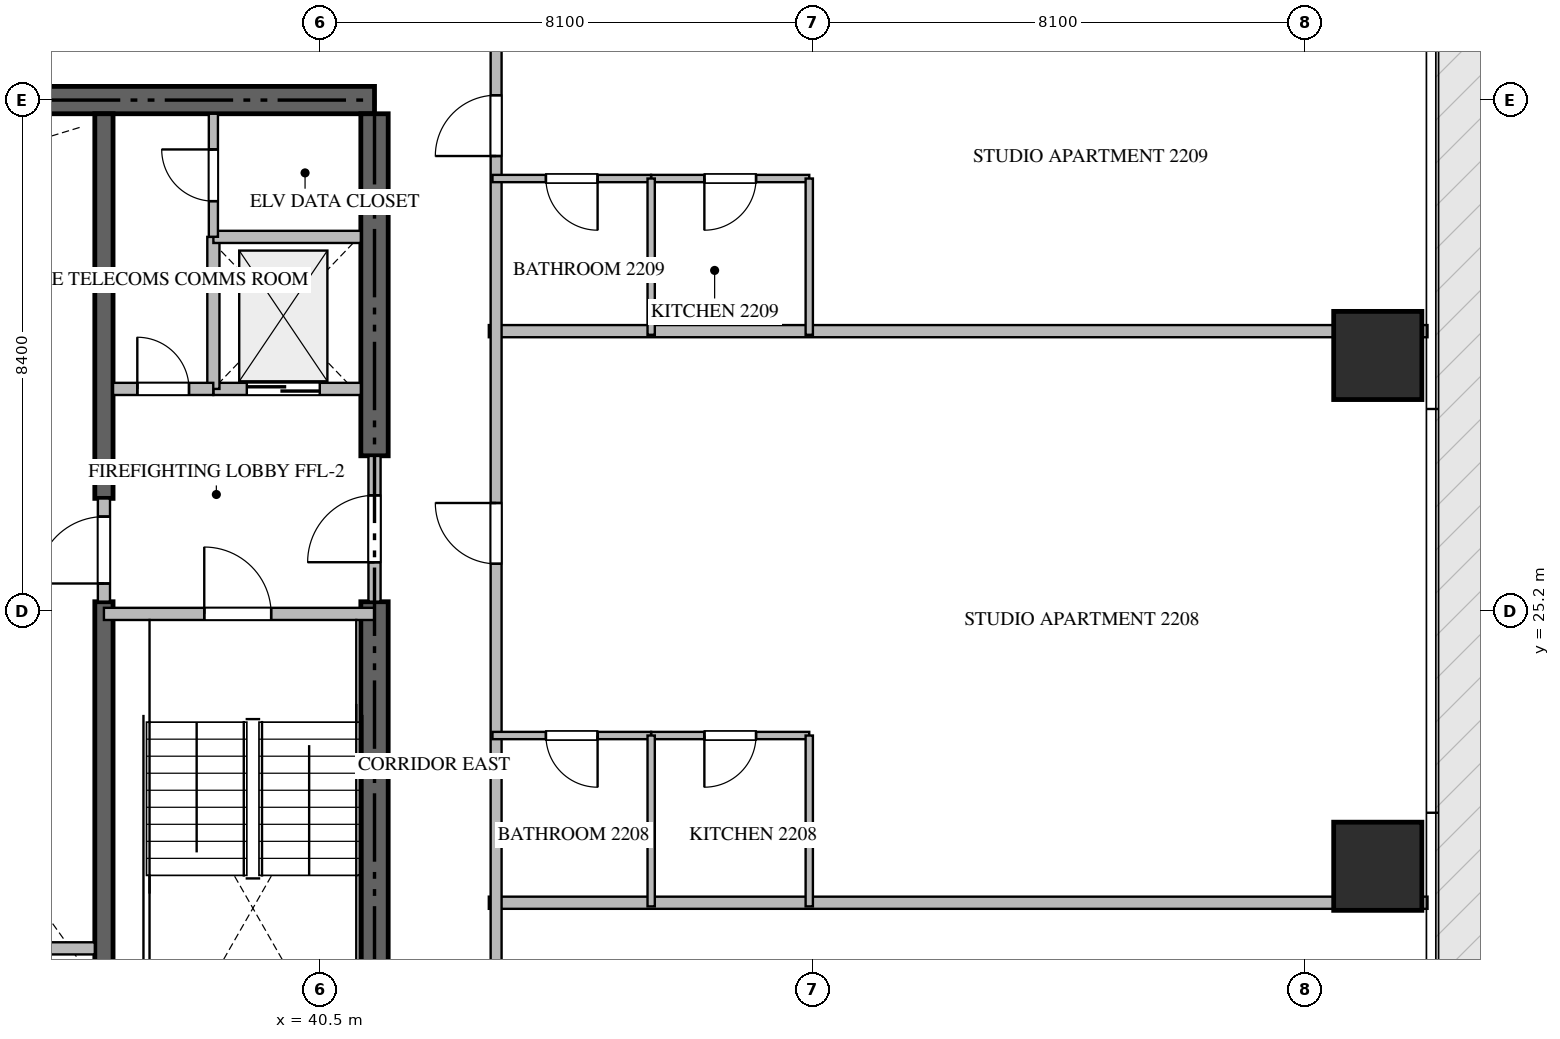
"""IFC4 building model, lengths in metres.
Left out: names, types, materials, properties, quantities, classifications, styles, units other than length and angle.
Written with IfcOpenShell. Run it as: python <this file> out.ifc"""

import sys

from ifc_helpers import new_model, si_unit, direction, frame, frame_2d, origin, origin_2d, place, context, subcontext, project, spatial, rectangle, extrude, source, transform, mapped, element, fill, save


model = new_model("IFC4")
c1 = context("Model", 3, precision=1e-05, world=origin(), true_north=direction((0.0, 1.0)))
c2 = subcontext(c1, "Body", "Model", "MODEL_VIEW")
j1 = project(units=[si_unit("LENGTHUNIT", "METRE"), si_unit("PLANEANGLEUNIT", "RADIAN")], contexts=[c1])
p1 = place(None, origin())
s1 = spatial("IfcSite", under=j1, at=p1, CompositionType="ELEMENT")
p2 = place(p1, origin())
s2 = spatial("IfcBuilding", under=s1, at=p2, CompositionType="ELEMENT")
p3 = place(p2, frame((0.0, 0.0, 90.45)))
s3 = spatial("IfcBuildingStorey", under=s2, at=p3, CompositionType="ELEMENT", Elevation=90.45)
p4 = place(p3, frame((41.4, 33.6, -0.26), z_axis=(0.0, 0.0, 1.0), x_axis=(-1.0, 0.0, 0.0)))
e1 = element("IfcWall", 1, at=p4, inside=s3, PredefinedType="SHEAR", context=c2, shape_type="SweptSolid", body=[
    extrude(rectangle(XDim=18.0, YDim=0.45, at=frame_2d((9.0, 0.0))), origin(), (0.0, 0.0, 1.0), 3.748),
])
p5 = place(p3, frame((41.4, 17.025, -0.26), z_axis=(0.0, 0.0, 1.0), x_axis=(0.0, 1.0, 0.0)))
e2 = element("IfcWall", 2, at=p5, inside=s3, PredefinedType="SHEAR", context=c2, shape_type="SweptSolid", body=[
    extrude(rectangle(XDim=8.325, YDim=0.45, at=frame_2d((4.163, 0.0))), origin(), (0.0, 0.0, 1.0), 3.748),
])
p6 = place(p3, frame((41.4, 27.75, -0.26), z_axis=(0.0, 0.0, 1.0), x_axis=(0.0, 1.0, 0.0)))
e3 = element("IfcWall", 3, at=p6, inside=s3, PredefinedType="SHEAR", context=c2, shape_type="SweptSolid", body=[
    extrude(rectangle(XDim=5.625, YDim=0.45, at=frame_2d((2.812, 0.0))), origin(), (0.0, 0.0, 1.0), 3.748),
])
p7 = place(p3, frame((36.95, 17.025, -0.26), z_axis=(0.0, 0.0, 1.0), x_axis=(0.0, 1.0, 0.0)))
e4 = element("IfcWall", 4, at=p7, inside=s3, PredefinedType="SHEAR", context=c2, shape_type="SweptSolid", body=[
    extrude(rectangle(XDim=8.325, YDim=0.3, at=frame_2d((4.163, 0.0))), origin(), (0.0, 0.0, 1.0), 3.748),
])
p8 = place(p3, frame((36.95, 27.05, -0.26), z_axis=(0.0, 0.0, 1.0), x_axis=(0.0, 1.0, 0.0)))
e5 = element("IfcWall", 5, at=p8, inside=s3, PredefinedType="SHEAR", context=c2, shape_type="SweptSolid", body=[
    extrude(rectangle(XDim=6.325, YDim=0.3, at=frame_2d((3.163, 0.0))), origin(), (0.0, 0.0, 1.0), 3.748),
])
m1 = source(origin(), c2, "Body", "SweptSolid", [
    extrude(rectangle(XDim=1.45, YDim=1.45, at=origin_2d()), origin(), (0.0, 0.0, 1.0), 3.75),
])
for number, where, z_axis, x_axis in (
    (6, (57.9, 21.0, -0.26), (0.0, 0.0, 1.0), (1.0, 0.0, 0.0)),
    (7, (57.9, 29.4, -0.26), (0.0, 0.0, 1.0), (1.0, 0.0, 0.0)),
):
    element("IfcColumn", number, at=place(p3, frame(where, z_axis=z_axis, x_axis=x_axis)), inside=s3, PredefinedType="COLUMN", context=c2, shape_type="MappedRepresentation", body=[
        mapped(m1, transform((0.0, 0.0, 0.0), scale=1.0)),
    ])
p9 = place(p3, frame((36.95, 25.15, 0.0), z_axis=(0.0, 0.0, 1.0), x_axis=(1.0, 0.0, 0.0)))
e8 = element("IfcWall", 8, at=p9, inside=s3, PredefinedType="STANDARD", context=c2, shape_type="SweptSolid", body=[
    extrude(rectangle(XDim=4.45, YDim=0.2, at=frame_2d((2.225, 0.0))), origin(), (0.0, 0.0, 1.0), 3.49),
])
p10 = place(p9, frame((1.65, 0.0, 0.0)))
e9 = element("IfcOpeningElement", 9, at=p10, cuts=e8, PredefinedType="OPENING", context=c2, shape_type="SweptSolid", body=[
    extrude(rectangle(XDim=1.1, YDim=2.15, at=frame_2d((0.55, 1.075))), frame((0.0, 0.11, 0.0), z_axis=(0.0, -1.0, 0.0), x_axis=(1.0, 0.0, 0.0)), (0.0, 0.0, 1.0), 0.22),
])
p11 = place(p3, frame((38.75, 28.85, 0.0), z_axis=(0.0, 0.0, 1.0), x_axis=(1.0, 0.0, 0.0)))
e10 = element("IfcWall", 10, at=p11, inside=s3, PredefinedType="STANDARD", context=c2, shape_type="SweptSolid", body=[
    extrude(rectangle(XDim=2.425, YDim=0.2, at=frame_2d((1.212, 0.0))), origin(), (0.0, 0.0, 1.0), 3.49),
])
p12 = place(p11, frame((0.55, 0.0, 0.0)))
e11 = element("IfcOpeningElement", 11, at=p12, cuts=e10, PredefinedType="OPENING", context=c2, shape_type="SweptSolid", body=[
    extrude(rectangle(XDim=1.2, YDim=2.2, at=frame_2d((0.6, 1.1))), frame((0.0, 0.11, 0.0), z_axis=(0.0, -1.0, 0.0), x_axis=(1.0, 0.0, 0.0)), (0.0, 0.0, 1.0), 0.22),
])
p13 = place(p3, frame((33.05, 19.65, 0.0), z_axis=(0.0, 0.0, 1.0), x_axis=(1.0, 0.0, 0.0)))
e12 = element("IfcWall", 12, at=p13, inside=s3, PredefinedType="STANDARD", context=c2, shape_type="SweptSolid", body=[
    extrude(rectangle(XDim=3.75, YDim=0.2, at=frame_2d((1.875, 0.0))), origin(), (0.0, 0.0, 1.0), 3.49),
])
p14 = place(p13, frame((0.65, 0.0, 0.0)))
e13 = element("IfcOpeningElement", 13, at=p14, cuts=e12, PredefinedType="OPENING", context=c2, shape_type="SweptSolid", body=[
    extrude(rectangle(XDim=1.1, YDim=2.2, at=frame_2d((0.55, 1.1))), frame((0.0, 0.11, 0.0), z_axis=(0.0, -1.0, 0.0), x_axis=(1.0, 0.0, 0.0)), (0.0, 0.0, 1.0), 0.22),
])
p15 = place(p3, frame((35.0, 30.65, 0.0), z_axis=(0.0, 0.0, 1.0), x_axis=(1.0, 0.0, 0.0)))
e14 = element("IfcWall", 14, at=p15, inside=s3, PredefinedType="STANDARD", context=c2, shape_type="SweptSolid", body=[
    extrude(rectangle(XDim=1.8, YDim=0.2, at=frame_2d((0.9, 0.0))), origin(), (0.0, 0.0, 1.0), 3.49),
])
p16 = place(p3, frame((38.75, 28.85, 0.0), z_axis=(0.0, 0.0, 1.0), x_axis=(0.0, 1.0, 0.0)))
e15 = element("IfcWall", 15, at=p16, inside=s3, PredefinedType="STANDARD", context=c2, shape_type="SweptSolid", body=[
    extrude(rectangle(XDim=2.5, YDim=0.2, at=frame_2d((1.25, 0.0))), origin(), (0.0, 0.0, 1.0), 3.49),
])
p17 = place(p3, frame((38.75, 31.35, 0.0), z_axis=(0.0, 0.0, 1.0), x_axis=(1.0, 0.0, 0.0)))
e16 = element("IfcWall", 16, at=p17, inside=s3, PredefinedType="STANDARD", context=c2, shape_type="SweptSolid", body=[
    extrude(rectangle(XDim=2.425, YDim=0.2, at=frame_2d((1.212, 0.0))), origin(), (0.0, 0.0, 1.0), 3.49),
])
p18 = place(p3, frame((37.1, 28.85, 0.0), z_axis=(0.0, 0.0, 1.0), x_axis=(1.0, 0.0, 0.0)))
e17 = element("IfcWall", 17, at=p18, inside=s3, PredefinedType="STANDARD", context=c2, shape_type="SweptSolid", body=[
    extrude(rectangle(XDim=1.648, YDim=0.2, at=frame_2d((0.824, 0.0))), origin(), (0.0, 0.0, 1.0), 3.49),
])
p19 = place(p18, frame((0.399, 0.0, 0.0)))
e18 = element("IfcOpeningElement", 18, at=p19, cuts=e17, PredefinedType="OPENING", context=c2, shape_type="SweptSolid", body=[
    extrude(rectangle(XDim=0.85, YDim=2.1, at=frame_2d((0.425, 1.05))), frame((0.0, 0.11, 0.0), z_axis=(0.0, -1.0, 0.0), x_axis=(1.0, 0.0, 0.0)), (0.0, 0.0, 1.0), 0.22),
])
p20 = place(p3, frame((41.4, 25.352, 0.0), z_axis=(0.0, 0.0, 1.0), x_axis=(0.0, 1.0, 0.0)))
e19 = element("IfcWall", 19, at=p20, inside=s3, PredefinedType="STANDARD", context=c2, shape_type="SweptSolid", body=[
    extrude(rectangle(XDim=2.396, YDim=0.2, at=frame_2d((1.198, 0.0))), origin(), (0.0, 0.0, 1.0), 3.49),
])
p21 = place(p20, frame((0.648, 0.0, 0.0)))
e20 = element("IfcOpeningElement", 20, at=p21, cuts=e19, PredefinedType="OPENING", context=c2, shape_type="SweptSolid", body=[
    extrude(rectangle(XDim=1.1, YDim=2.15, at=frame_2d((0.55, 1.075))), frame((0.0, 0.11, 0.0), z_axis=(0.0, -1.0, 0.0), x_axis=(1.0, 0.0, 0.0)), (0.0, 0.0, 1.0), 0.22),
])
p22 = place(p3, frame((36.95, 25.352, 0.0), z_axis=(0.0, 0.0, 1.0), x_axis=(0.0, 1.0, 0.0)))
e21 = element("IfcWall", 21, at=p22, inside=s3, PredefinedType="STANDARD", context=c2, shape_type="SweptSolid", body=[
    extrude(rectangle(XDim=1.696, YDim=0.2, at=frame_2d((0.848, 0.0))), origin(), (0.0, 0.0, 1.0), 3.49),
])
p23 = place(p22, frame((0.298, 0.0, 0.0)))
e22 = element("IfcOpeningElement", 22, at=p23, cuts=e21, PredefinedType="OPENING", context=c2, shape_type="SweptSolid", body=[
    extrude(rectangle(XDim=1.1, YDim=2.15, at=frame_2d((0.55, 1.075))), frame((0.0, 0.11, 0.0), z_axis=(0.0, -1.0, 0.0), x_axis=(1.0, 0.0, 0.0)), (0.0, 0.0, 1.0), 0.22),
])
p24 = place(p3, frame((38.75, 31.352, 0.0), z_axis=(0.0, 0.0, 1.0), x_axis=(0.0, 1.0, 0.0)))
e23 = element("IfcWall", 23, at=p24, inside=s3, PredefinedType="PARTITIONING", context=c2, shape_type="SweptSolid", body=[
    extrude(rectangle(XDim=2.023, YDim=0.15, at=frame_2d((1.011, 0.0))), origin(), (0.0, 0.0, 1.0), 3.49),
])
p25 = place(p24, frame((0.586, 0.0, 0.0)))
e24 = element("IfcOpeningElement", 24, at=p25, cuts=e23, PredefinedType="OPENING", context=c2, shape_type="SweptSolid", body=[
    extrude(rectangle(XDim=0.85, YDim=2.1, at=frame_2d((0.425, 1.05))), frame((0.0, 0.085, 0.0), z_axis=(0.0, -1.0, 0.0), x_axis=(1.0, 0.0, 0.0)), (0.0, 0.0, 1.0), 0.17),
])
for number, where, z_axis, x_axis in (
    (25, (43.28, 20.4, 0.0), (0.0, 0.0, 1.0), (1.0, 0.0, 0.0)),
    (26, (43.28, 29.8, 0.0), (0.0, 0.0, 1.0), (1.0, 0.0, 0.0)),
):
    element("IfcWall", number, at=place(p3, frame(where, z_axis=z_axis, x_axis=x_axis)), inside=s3, PredefinedType="PARTITIONING", context=c2, shape_type="SweptSolid", body=[
        extrude(rectangle(XDim=15.438, YDim=0.2, at=frame_2d((7.719, 0.0))), origin(), (0.0, 0.0, 1.0), 3.49),
    ])
p26 = place(p3, frame((43.4, 14.9, 0.0), z_axis=(0.0, 0.0, 1.0), x_axis=(0.0, 1.0, 0.0)))
e27 = element("IfcWall", 27, at=p26, inside=s3, PredefinedType="PARTITIONING", context=c2, shape_type="SweptSolid", body=[
    extrude(rectangle(XDim=20.6, YDim=0.18, at=frame_2d((10.3, 0.0))), origin(), (0.0, 0.0, 1.0), 3.49),
])
p27 = place(p26, frame((3.469, 0.0, 0.0)))
e28 = element("IfcOpeningElement", 28, at=p27, cuts=e27, PredefinedType="OPENING", context=c2, shape_type="SweptSolid", body=[
    extrude(rectangle(XDim=1.0, YDim=2.15, at=frame_2d((0.5, 1.075))), frame((0.0, 0.1, 0.0), z_axis=(0.0, -1.0, 0.0), x_axis=(1.0, 0.0, 0.0)), (0.0, 0.0, 1.0), 0.2),
])
p28 = place(p26, frame((11.074, 0.0, 0.0)))
e29 = element("IfcOpeningElement", 29, at=p28, cuts=e27, PredefinedType="OPENING", context=c2, shape_type="SweptSolid", body=[
    extrude(rectangle(XDim=1.0, YDim=2.15, at=frame_2d((0.5, 1.075))), frame((0.0, 0.1, 0.0), z_axis=(0.0, -1.0, 0.0), x_axis=(1.0, 0.0, 0.0)), (0.0, 0.0, 1.0), 0.2),
])
p29 = place(p26, frame((17.78, 0.0, 0.0)))
e30 = element("IfcOpeningElement", 30, at=p29, cuts=e27, PredefinedType="OPENING", context=c2, shape_type="SweptSolid", body=[
    extrude(rectangle(XDim=1.0, YDim=2.15, at=frame_2d((0.5, 1.075))), frame((0.0, 0.1, 0.0), z_axis=(0.0, -1.0, 0.0), x_axis=(1.0, 0.0, 0.0)), (0.0, 0.0, 1.0), 0.2),
])
p30 = place(p3, frame((48.55, 23.15, 0.0), z_axis=(0.0, 0.0, 1.0), x_axis=(-1.0, 0.0, 0.0)))
e31 = element("IfcWall", 31, at=p30, inside=s3, PredefinedType="PARTITIONING", context=c2, shape_type="SweptSolid", body=[
    extrude(rectangle(XDim=2.6, YDim=0.12, at=frame_2d((1.3, 0.0))), origin(), (0.0, 0.0, 1.0), 3.49),
])
p31 = place(p30, frame((0.875, 0.0, 0.0)))
e32 = element("IfcOpeningElement", 32, at=p31, cuts=e31, PredefinedType="OPENING", context=c2, shape_type="SweptSolid", body=[
    extrude(rectangle(XDim=0.85, YDim=2.1, at=frame_2d((0.425, 1.05))), frame((0.0, 0.07, 0.0), z_axis=(0.0, -1.0, 0.0), x_axis=(1.0, 0.0, 0.0)), (0.0, 0.0, 1.0), 0.14),
])
p32 = place(p3, frame((45.948, 23.15, 0.0), z_axis=(0.0, 0.0, 1.0), x_axis=(-1.0, 0.0, 0.0)))
e33 = element("IfcWall", 33, at=p32, inside=s3, PredefinedType="PARTITIONING", context=c2, shape_type="SweptSolid", body=[
    extrude(rectangle(XDim=2.608, YDim=0.12, at=frame_2d((1.304, 0.0))), origin(), (0.0, 0.0, 1.0), 3.49),
])
p33 = place(p32, frame((0.879, 0.0, 0.0)))
e34 = element("IfcOpeningElement", 34, at=p33, cuts=e33, PredefinedType="OPENING", context=c2, shape_type="SweptSolid", body=[
    extrude(rectangle(XDim=0.85, YDim=2.1, at=frame_2d((0.425, 1.05))), frame((0.0, 0.07, 0.0), z_axis=(0.0, -1.0, 0.0), x_axis=(1.0, 0.0, 0.0)), (0.0, 0.0, 1.0), 0.14),
])
for number, where, z_axis, x_axis in (
    (35, (45.95, 20.34, 0.0), (0.0, 0.0, 1.0), (0.0, 1.0, 0.0)),
    (36, (48.55, 20.34, 0.0), (0.0, 0.0, 1.0), (0.0, 1.0, 0.0)),
):
    element("IfcWall", number, at=place(p3, frame(where, z_axis=z_axis, x_axis=x_axis)), inside=s3, PredefinedType="PARTITIONING", context=c2, shape_type="SweptSolid", body=[
        extrude(rectangle(XDim=2.81, YDim=0.12, at=frame_2d((1.405, 0.0))), origin(), (0.0, 0.0, 1.0), 3.49),
    ])
p34 = place(p3, frame((48.55, 32.31, 0.0), z_axis=(0.0, 0.0, 1.0), x_axis=(-1.0, 0.0, 0.0)))
e37 = element("IfcWall", 37, at=p34, inside=s3, PredefinedType="PARTITIONING", context=c2, shape_type="SweptSolid", body=[
    extrude(rectangle(XDim=2.6, YDim=0.12, at=frame_2d((1.3, 0.0))), origin(), (0.0, 0.0, 1.0), 3.49),
])
p35 = place(p34, frame((0.875, 0.0, 0.0)))
e38 = element("IfcOpeningElement", 38, at=p35, cuts=e37, PredefinedType="OPENING", context=c2, shape_type="SweptSolid", body=[
    extrude(rectangle(XDim=0.85, YDim=2.1, at=frame_2d((0.425, 1.05))), frame((0.0, 0.07, 0.0), z_axis=(0.0, -1.0, 0.0), x_axis=(1.0, 0.0, 0.0)), (0.0, 0.0, 1.0), 0.14),
])
p36 = place(p3, frame((45.948, 32.31, 0.0), z_axis=(0.0, 0.0, 1.0), x_axis=(-1.0, 0.0, 0.0)))
e39 = element("IfcWall", 39, at=p36, inside=s3, PredefinedType="PARTITIONING", context=c2, shape_type="SweptSolid", body=[
    extrude(rectangle(XDim=2.608, YDim=0.12, at=frame_2d((1.304, 0.0))), origin(), (0.0, 0.0, 1.0), 3.49),
])
p37 = place(p36, frame((0.879, 0.0, 0.0)))
e40 = element("IfcOpeningElement", 40, at=p37, cuts=e39, PredefinedType="OPENING", context=c2, shape_type="SweptSolid", body=[
    extrude(rectangle(XDim=0.85, YDim=2.1, at=frame_2d((0.425, 1.05))), frame((0.0, 0.07, 0.0), z_axis=(0.0, -1.0, 0.0), x_axis=(1.0, 0.0, 0.0)), (0.0, 0.0, 1.0), 0.14),
])
for number, where, z_axis, x_axis in (
    (41, (45.95, 29.74, 0.0), (0.0, 0.0, 1.0), (0.0, 1.0, 0.0)),
    (42, (48.55, 29.74, 0.0), (0.0, 0.0, 1.0), (0.0, 1.0, 0.0)),
):
    element("IfcWall", number, at=place(p3, frame(where, z_axis=z_axis, x_axis=x_axis)), inside=s3, PredefinedType="PARTITIONING", context=c2, shape_type="SweptSolid", body=[
        extrude(rectangle(XDim=2.57, YDim=0.12, at=frame_2d((1.285, 0.0))), origin(), (0.0, 0.0, 1.0), 3.49),
    ])
m2 = source(origin(), c2, "Body", "SweptSolid", [
    extrude(rectangle(XDim=1.1, YDim=2.15, at=frame_2d((0.55, 1.075))), frame((0.0, 0.025, 0.0), z_axis=(0.0, -1.0, 0.0), x_axis=(1.0, 0.0, 0.0)), (0.0, 0.0, 1.0), 0.05),
])
p38 = place(p10, origin())
e43 = element("IfcDoor", 43, at=p38, inside=s3, OperationType="SINGLE_SWING_LEFT", PredefinedType="DOOR", context=c2, shape_type="MappedRepresentation", body=[
    mapped(m2, transform((0.0, 0.0, 0.0), scale=1.0)),
])
fill(e9, e43)
m3 = source(origin(), c2, "Body", "SweptSolid", [
    extrude(rectangle(XDim=1.2, YDim=2.2, at=frame_2d((0.6, 1.1))), frame((0.0, 0.025, 0.0), z_axis=(0.0, -1.0, 0.0), x_axis=(1.0, 0.0, 0.0)), (0.0, 0.0, 1.0), 0.05),
])
p39 = place(p12, origin())
e44 = element("IfcDoor", 44, at=p39, inside=s3, OperationType="DOUBLE_DOOR_SLIDING", PredefinedType="DOOR", context=c2, shape_type="MappedRepresentation", body=[
    mapped(m3, transform((0.0, 0.0, 0.0), scale=1.0)),
])
fill(e11, e44)
m4 = source(origin(), c2, "Body", "SweptSolid", [
    extrude(rectangle(XDim=0.85, YDim=2.1, at=frame_2d((0.425, 1.05))), frame((0.0, 0.025, 0.0), z_axis=(0.0, -1.0, 0.0), x_axis=(1.0, 0.0, 0.0)), (0.0, 0.0, 1.0), 0.05),
])
p40 = place(p19, origin())
e45 = element("IfcDoor", 45, at=p40, inside=s3, OperationType="SINGLE_SWING_LEFT", PredefinedType="DOOR", context=c2, shape_type="MappedRepresentation", body=[
    mapped(m4, transform((0.0, 0.0, 0.0), scale=1.0)),
])
fill(e18, e45)
p41 = place(p21, origin())
e46 = element("IfcDoor", 46, at=p41, inside=s3, OperationType="SINGLE_SWING_LEFT", PredefinedType="DOOR", context=c2, shape_type="MappedRepresentation", body=[
    mapped(m2, transform((0.0, 0.0, 0.0), scale=1.0)),
])
fill(e20, e46)
p42 = place(p23, origin())
e47 = element("IfcDoor", 47, at=p42, inside=s3, OperationType="SINGLE_SWING_LEFT", PredefinedType="DOOR", context=c2, shape_type="MappedRepresentation", body=[
    mapped(m2, transform((0.0, 0.0, 0.0), scale=1.0)),
])
fill(e22, e47)
p43 = place(p25, origin())
e48 = element("IfcDoor", 48, at=p43, inside=s3, OperationType="SINGLE_SWING_RIGHT", PredefinedType="DOOR", context=c2, shape_type="MappedRepresentation", body=[
    mapped(m4, transform((0.0, 0.0, 0.0), scale=1.0)),
])
fill(e24, e48)
m5 = source(origin(), c2, "Body", "SweptSolid", [
    extrude(rectangle(XDim=1.0, YDim=2.15, at=frame_2d((0.5, 1.075))), frame((0.0, 0.025, 0.0), z_axis=(0.0, -1.0, 0.0), x_axis=(1.0, 0.0, 0.0)), (0.0, 0.0, 1.0), 0.05),
])
p44 = place(p28, origin())
e49 = element("IfcDoor", 49, at=p44, inside=s3, OperationType="SINGLE_SWING_RIGHT", PredefinedType="DOOR", context=c2, shape_type="MappedRepresentation", body=[
    mapped(m5, transform((0.0, 0.0, 0.0), scale=1.0)),
])
fill(e29, e49)
p45 = place(p29, origin())
e50 = element("IfcDoor", 50, at=p45, inside=s3, OperationType="SINGLE_SWING_LEFT", PredefinedType="DOOR", context=c2, shape_type="MappedRepresentation", body=[
    mapped(m5, transform((0.0, 0.0, 0.0), scale=1.0)),
])
fill(e30, e50)
p46 = place(p31, origin())
e51 = element("IfcDoor", 51, at=p46, inside=s3, OperationType="SINGLE_SWING_RIGHT", PredefinedType="DOOR", context=c2, shape_type="MappedRepresentation", body=[
    mapped(m4, transform((0.0, 0.0, 0.0), scale=1.0)),
])
fill(e32, e51)
p47 = place(p33, origin())
e52 = element("IfcDoor", 52, at=p47, inside=s3, OperationType="SINGLE_SWING_LEFT", PredefinedType="DOOR", context=c2, shape_type="MappedRepresentation", body=[
    mapped(m4, transform((0.0, 0.0, 0.0), scale=1.0)),
])
fill(e34, e52)
p48 = place(p35, origin())
e53 = element("IfcDoor", 53, at=p48, inside=s3, OperationType="SINGLE_SWING_RIGHT", PredefinedType="DOOR", context=c2, shape_type="MappedRepresentation", body=[
    mapped(m4, transform((0.0, 0.0, 0.0), scale=1.0)),
])
fill(e38, e53)
p49 = place(p37, origin())
e54 = element("IfcDoor", 54, at=p49, inside=s3, OperationType="SINGLE_SWING_LEFT", PredefinedType="DOOR", context=c2, shape_type="MappedRepresentation", body=[
    mapped(m4, transform((0.0, 0.0, 0.0), scale=1.0)),
])
fill(e40, e54)
save(model, sys.argv[1])
